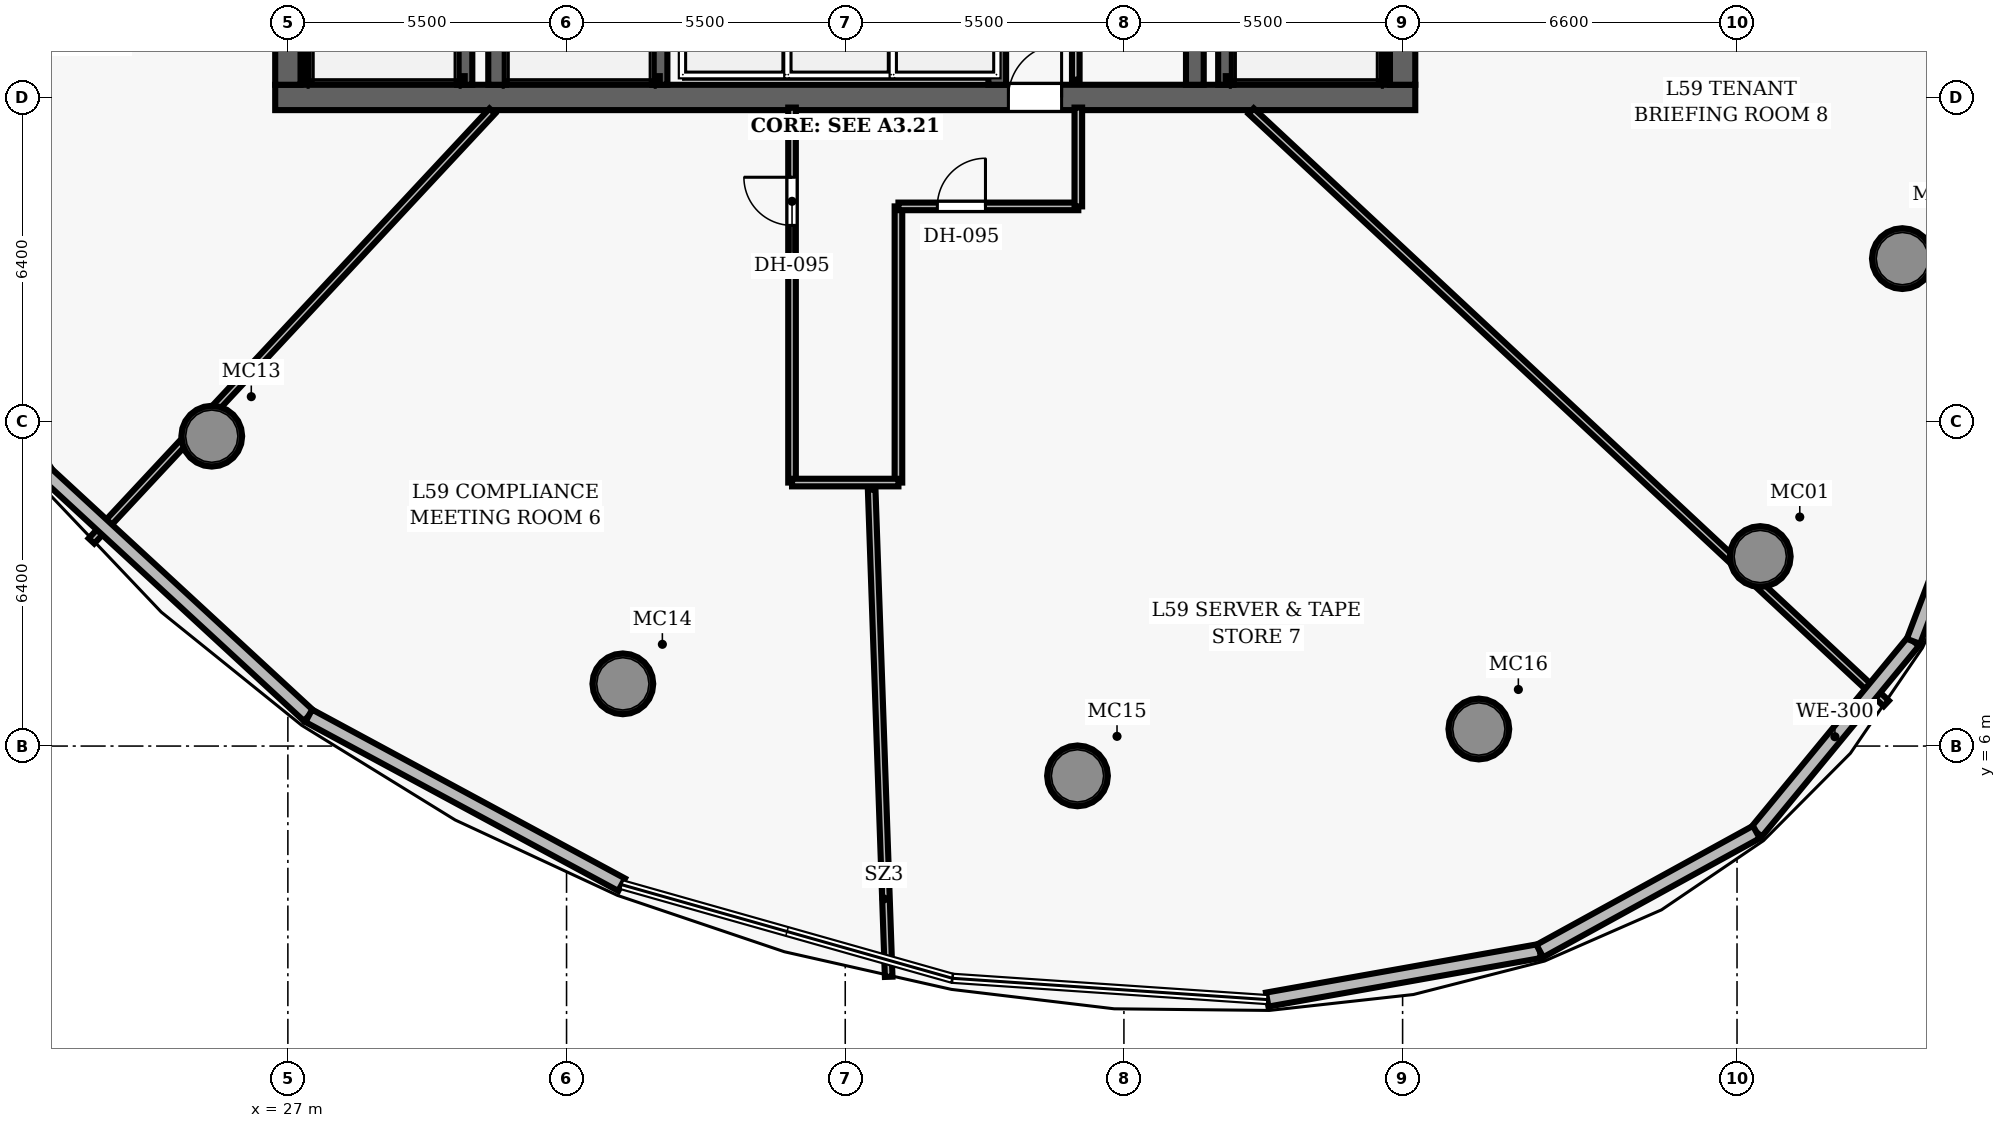
"""IFC4 building model, lengths in metres.
Left out: names, types, materials, properties, quantities, classifications, styles, units other than length and angle.
Written with IfcOpenShell. Run it as: python <this file> out.ifc"""

import sys

from ifc_helpers import new_model, si_unit, direction, frame, frame_2d, origin, origin_2d, place, context, subcontext, project, spatial, rectangle, hollow_circle, extrude, element, fill, save


model = new_model("IFC4")
c1 = context("Model", 3, precision=1e-05, world=origin(), true_north=direction((0.0, 1.0)))
c2 = subcontext(c1, "Body", "Model", "MODEL_VIEW")
j1 = project(units=[si_unit("LENGTHUNIT", "METRE"), si_unit("PLANEANGLEUNIT", "RADIAN")], contexts=[c1])
p1 = place(None, origin())
s1 = spatial("IfcSite", under=j1, at=p1, CompositionType="ELEMENT")
p2 = place(p1, origin())
s2 = spatial("IfcBuilding", under=s1, at=p2, CompositionType="ELEMENT")
p3 = place(p2, frame((0.0, 0.0, 232.8)))
s3 = spatial("IfcBuildingStorey", under=s2, at=p3, CompositionType="ELEMENT", Elevation=232.8)
p4 = place(p3, frame((26.75, 18.8, 0.0), z_axis=(0.0, 0.0, 1.0), x_axis=(1.0, 0.0, 0.0)))
e1 = element("IfcWall", 1, at=p4, inside=s3, PredefinedType="SHEAR", context=c2, shape_type="SweptSolid", body=[
    extrude(rectangle(XDim=22.5, YDim=0.5, at=frame_2d((11.25, 0.0))), origin(), (0.0, 0.0, 1.0), 3.85),
])
p5 = place(p4, frame((14.47, 0.0, 0.0)))
e2 = element("IfcOpeningElement", 2, at=p5, cuts=e1, PredefinedType="OPENING", context=c2, shape_type="SweptSolid", body=[
    extrude(rectangle(XDim=1.05, YDim=2.15, at=frame_2d((0.525, 1.075))), frame((0.0, 0.26, 0.0), z_axis=(0.0, -1.0, 0.0), x_axis=(1.0, 0.0, 0.0)), (0.0, 0.0, 1.0), 0.52),
])
p6 = place(p3, frame((27.0, 19.05, 0.0), z_axis=(0.0, 0.0, 1.0), x_axis=(0.0, 1.0, 0.0)))
e3 = element("IfcWall", 3, at=p6, inside=s3, PredefinedType="SHEAR", context=c2, shape_type="SweptSolid", body=[
    extrude(rectangle(XDim=13.9, YDim=0.5, at=frame_2d((6.95, 0.0))), origin(), (0.0, 0.0, 1.0), 3.85),
])
p7 = place(p6, frame((8.2, 0.0, 0.0)))
e4 = element("IfcOpeningElement", 4, at=p7, cuts=e3, PredefinedType="OPENING", context=c2, shape_type="SweptSolid", body=[
    extrude(rectangle(XDim=1.05, YDim=2.15, at=frame_2d((0.525, 1.075))), frame((0.0, 0.26, 0.0), z_axis=(0.0, -1.0, 0.0), x_axis=(1.0, 0.0, 0.0)), (0.0, 0.0, 1.0), 0.52),
])
p8 = place(p3, frame((49.0, 19.05, 0.0), z_axis=(0.0, 0.0, 1.0), x_axis=(0.0, 1.0, 0.0)))
e5 = element("IfcWall", 5, at=p8, inside=s3, PredefinedType="SHEAR", context=c2, shape_type="SweptSolid", body=[
    extrude(rectangle(XDim=13.9, YDim=0.5, at=frame_2d((6.95, 0.0))), origin(), (0.0, 0.0, 1.0), 3.85),
])
p9 = place(p8, frame((8.2, 0.0, 0.0)))
e6 = element("IfcOpeningElement", 6, at=p9, cuts=e5, PredefinedType="OPENING", context=c2, shape_type="SweptSolid", body=[
    extrude(rectangle(XDim=1.05, YDim=2.15, at=frame_2d((0.525, 1.075))), frame((0.0, 0.26, 0.0), z_axis=(0.0, -1.0, 0.0), x_axis=(1.0, 0.0, 0.0)), (0.0, 0.0, 1.0), 0.52),
])
for number, where, z_axis, x_axis in (
    (7, (31.13, 19.05, 0.0), (0.0, 0.0, 1.0), (0.0, 1.0, 0.0)),
    (8, (44.9, 19.05, 0.0), (0.0, 0.0, 1.0), (0.0, 1.0, 0.0)),
):
    element("IfcWall", number, at=place(p3, frame(where, z_axis=z_axis, x_axis=x_axis)), inside=s3, PredefinedType="SHEAR", context=c2, shape_type="SweptSolid", body=[
        extrude(rectangle(XDim=13.9, YDim=0.35, at=frame_2d((6.95, 0.0))), origin(), (0.0, 0.0, 1.0), 3.85),
    ])
for number, where, z_axis, x_axis in (
    (9, (56.058, 9.74, 0.0), (0.0, 0.0, 1.0), (1.0, 0.0, 0.0)),
    (10, (58.863, 15.619, 0.0), (0.0, 0.0, 1.0), (1.0, 0.0, 0.0)),
    (11, (25.498, 12.115, 0.0), (0.0, 0.0, 1.0), (1.0, 0.0, 0.0)),
    (12, (33.611, 7.228, 0.0), (0.0, 0.0, 1.0), (1.0, 0.0, 0.0)),
    (13, (42.584, 5.412, 0.0), (0.0, 0.0, 1.0), (1.0, 0.0, 0.0)),
    (14, (50.504, 6.336, 0.0), (0.0, 0.0, 1.0), (1.0, 0.0, 0.0)),
):
    element("IfcColumn", number, at=place(p3, frame(where, z_axis=z_axis, x_axis=x_axis)), inside=s3, PredefinedType="COLUMN", context=c2, shape_type="SweptSolid", body=[
        extrude(hollow_circle(Radius=0.6, WallThickness=0.05, at=origin_2d()), origin(), (0.0, 0.0, 1.0), 3.85),
    ])
p10 = place(p3, frame((30.49, 19.05, 0.0), z_axis=(0.0, 0.0, 1.0), x_axis=(0.0, 1.0, 0.0)))
e15 = element("IfcWall", 15, at=p10, inside=s3, PredefinedType="SHEAR", context=c2, shape_type="SweptSolid", body=[
    extrude(rectangle(XDim=7.5, YDim=0.3, at=frame_2d((3.75, 0.0))), origin(), (0.0, 0.0, 1.0), 3.85),
])
p11 = place(p3, frame((27.395, 19.1, 0.0), z_axis=(0.0, 0.0, 1.0), x_axis=(0.0, 1.0, 0.0)))
e16 = element("IfcWall", 16, at=p11, inside=s3, PredefinedType="SHEAR", context=c2, shape_type="SweptSolid", body=[
    extrude(rectangle(XDim=7.45, YDim=0.12, at=frame_2d((3.725, 0.0))), origin(), (0.0, 0.0, 1.0), 3.85),
])
p12 = place(p3, frame((27.395, 19.16, 0.0), z_axis=(0.0, 0.0, 1.0), x_axis=(1.0, 0.0, 0.0)))
e17 = element("IfcWall", 17, at=p12, inside=s3, PredefinedType="SHEAR", context=c2, shape_type="SweptSolid", body=[
    extrude(rectangle(XDim=3.095, YDim=0.12, at=frame_2d((1.547, 0.0))), origin(), (0.0, 0.0, 1.0), 3.85),
])
p13 = place(p3, frame((45.51, 19.05, 0.0), z_axis=(0.0, 0.0, 1.0), x_axis=(0.0, 1.0, 0.0)))
e18 = element("IfcWall", 18, at=p13, inside=s3, PredefinedType="SHEAR", context=c2, shape_type="SweptSolid", body=[
    extrude(rectangle(XDim=7.5, YDim=0.3, at=frame_2d((3.75, 0.0))), origin(), (0.0, 0.0, 1.0), 3.85),
])
p14 = place(p3, frame((48.605, 19.1, 0.0), z_axis=(0.0, 0.0, 1.0), x_axis=(0.0, 1.0, 0.0)))
e19 = element("IfcWall", 19, at=p14, inside=s3, PredefinedType="SHEAR", context=c2, shape_type="SweptSolid", body=[
    extrude(rectangle(XDim=7.45, YDim=0.12, at=frame_2d((3.725, 0.0))), origin(), (0.0, 0.0, 1.0), 3.85),
])
p15 = place(p3, frame((45.51, 19.16, 0.0), z_axis=(0.0, 0.0, 1.0), x_axis=(1.0, 0.0, 0.0)))
e20 = element("IfcWall", 20, at=p15, inside=s3, PredefinedType="SHEAR", context=c2, shape_type="SweptSolid", body=[
    extrude(rectangle(XDim=3.095, YDim=0.12, at=frame_2d((1.547, 0.0))), origin(), (0.0, 0.0, 1.0), 3.85),
])
p16 = place(p3, frame((34.34, 19.05, 0.0), z_axis=(0.0, 0.0, 1.0), x_axis=(0.0, 1.0, 0.0)))
e21 = element("IfcWall", 21, at=p16, inside=s3, PredefinedType="SHEAR", context=c2, shape_type="SweptSolid", body=[
    extrude(rectangle(XDim=7.5, YDim=0.3, at=frame_2d((3.75, 0.0))), origin(), (0.0, 0.0, 1.0), 3.85),
])
p17 = place(p3, frame((31.3, 19.16, 0.0), z_axis=(0.0, 0.0, 1.0), x_axis=(1.0, 0.0, 0.0)))
e22 = element("IfcWall", 22, at=p17, inside=s3, PredefinedType="SHEAR", context=c2, shape_type="SweptSolid", body=[
    extrude(rectangle(XDim=3.04, YDim=0.12, at=frame_2d((1.52, 0.0))), origin(), (0.0, 0.0, 1.0), 3.85),
])
p18 = place(p3, frame((41.0, 19.05, 0.0), z_axis=(0.0, 0.0, 1.0), x_axis=(0.0, 1.0, 0.0)))
e23 = element("IfcWall", 23, at=p18, inside=s3, PredefinedType="SHEAR", context=c2, shape_type="SweptSolid", body=[
    extrude(rectangle(XDim=2.08, YDim=0.35, at=frame_2d((1.04, 0.0))), origin(), (0.0, 0.0, 1.0), 2.915),
])
p19 = place(p3, frame((42.55, 19.15, 0.0), z_axis=(0.0, 0.0, 1.0), x_axis=(0.0, 1.0, 0.0)))
e24 = element("IfcWall", 24, at=p19, inside=s3, PredefinedType="PARTITIONING", context=c2, shape_type="SweptSolid", body=[
    extrude(rectangle(XDim=2.75, YDim=0.15, at=frame_2d((1.375, 0.0))), origin(), (0.0, 0.0, 1.0), 2.915),
])
p20 = place(p19, frame((0.7, 0.0, 0.0)))
e25 = element("IfcOpeningElement", 25, at=p20, cuts=e24, PredefinedType="OPENING", context=c2, shape_type="SweptSolid", body=[
    extrude(rectangle(XDim=0.85, YDim=2.1, at=frame_2d((0.425, 1.05))), frame((0.0, 0.085, 0.0), z_axis=(0.0, -1.0, 0.0), x_axis=(1.0, 0.0, 0.0)), (0.0, 0.0, 1.0), 0.17),
])
p21 = place(p3, frame((36.95, 11.2, 0.0), z_axis=(0.0, 0.0, 1.0), x_axis=(0.0, 1.0, 0.0)))
e26 = element("IfcWall", 26, at=p21, inside=s3, PredefinedType="PARTITIONING", context=c2, shape_type="SweptSolid", body=[
    extrude(rectangle(XDim=7.4, YDim=0.15, at=frame_2d((3.7, 0.0))), origin(), (0.0, 0.0, 1.0), 2.915),
])
p22 = place(p21, frame((5.075, 0.0, 0.0)))
e27 = element("IfcOpeningElement", 27, at=p22, cuts=e26, PredefinedType="OPENING", context=c2, shape_type="SweptSolid", body=[
    extrude(rectangle(XDim=0.95, YDim=2.15, at=frame_2d((0.475, 1.075))), frame((0.0, 0.085, 0.0), z_axis=(0.0, -1.0, 0.0), x_axis=(1.0, 0.0, 0.0)), (0.0, 0.0, 1.0), 0.17),
])
p23 = place(p3, frame((39.05, 11.2, 0.0), z_axis=(0.0, 0.0, 1.0), x_axis=(0.0, 1.0, 0.0)))
e28 = element("IfcWall", 28, at=p23, inside=s3, PredefinedType="PARTITIONING", context=c2, shape_type="SweptSolid", body=[
    extrude(rectangle(XDim=5.45, YDim=0.15, at=frame_2d((2.725, 0.0))), origin(), (0.0, 0.0, 1.0), 2.915),
])
p24 = place(p3, frame((39.05, 16.65, 0.0), z_axis=(0.0, 0.0, 1.0), x_axis=(1.0, 0.0, 0.0)))
e29 = element("IfcWall", 29, at=p24, inside=s3, PredefinedType="PARTITIONING", context=c2, shape_type="SweptSolid", body=[
    extrude(rectangle(XDim=3.55, YDim=0.15, at=frame_2d((1.775, 0.0))), origin(), (0.0, 0.0, 1.0), 2.915),
])
p25 = place(p24, frame((0.768, 0.0, 0.0)))
e30 = element("IfcOpeningElement", 30, at=p25, cuts=e29, PredefinedType="OPENING", context=c2, shape_type="SweptSolid", body=[
    extrude(rectangle(XDim=0.95, YDim=2.15, at=frame_2d((0.475, 1.075))), frame((0.0, 0.085, 0.0), z_axis=(0.0, -1.0, 0.0), x_axis=(1.0, 0.0, 0.0)), (0.0, 0.0, 1.0), 0.17),
])
p26 = place(p3, frame((42.6, 16.65, 0.0), z_axis=(0.0, 0.0, 1.0), x_axis=(0.0, 1.0, 0.0)))
e31 = element("IfcWall", 31, at=p26, inside=s3, PredefinedType="PARTITIONING", context=c2, shape_type="SweptSolid", body=[
    extrude(rectangle(XDim=1.95, YDim=0.15, at=frame_2d((0.975, 0.0))), origin(), (0.0, 0.0, 1.0), 2.915),
])
p27 = place(p3, frame((36.95, 11.2, 0.0), z_axis=(0.0, 0.0, 1.0), x_axis=(1.0, 0.0, 0.0)))
e32 = element("IfcWall", 32, at=p27, inside=s3, PredefinedType="PARTITIONING", context=c2, shape_type="SweptSolid", body=[
    extrude(rectangle(XDim=2.1, YDim=0.15, at=frame_2d((1.05, 0.0))), origin(), (0.0, 0.0, 1.0), 2.915),
])
p28 = place(p3, frame((31.034, 18.53, 0.0), z_axis=(0.0, 0.0, 1.0), x_axis=(-0.681994935562, -0.731356895002, 0.0)))
e33 = element("IfcWall", 33, at=p28, inside=s3, PredefinedType="PARTITIONING", context=c2, shape_type="SweptSolid", body=[
    extrude(rectangle(XDim=11.598, YDim=0.15, at=frame_2d((5.799, 0.0))), origin(), (0.0, 0.0, 1.0), 2.915),
])
p29 = place(p3, frame((38.522, 11.06, 0.0), z_axis=(0.0, 0.0, 1.0), x_axis=(0.034896706819, -0.99939092444, 0.0)))
e34 = element("IfcWall", 34, at=p29, inside=s3, PredefinedType="PARTITIONING", context=c2, shape_type="SweptSolid", body=[
    extrude(rectangle(XDim=9.62, YDim=0.15, at=frame_2d((4.81, 0.0))), origin(), (0.0, 0.0, 1.0), 2.915),
])
p30 = place(p3, frame((46.01, 18.53, 0.0), z_axis=(0.0, 0.0, 1.0), x_axis=(0.731354089415, -0.681997944202, 0.0)))
e35 = element("IfcWall", 35, at=p30, inside=s3, PredefinedType="PARTITIONING", context=c2, shape_type="SweptSolid", body=[
    extrude(rectangle(XDim=17.14, YDim=0.15, at=frame_2d((8.57, 0.0))), origin(), (0.0, 0.0, 1.0), 2.915),
])
p31 = place(p3, frame((59.082, 8.066, 0.0), z_axis=(0.0, 0.0, 1.0), x_axis=(-0.635840615574, -0.771820388165, 0.0)))
e36 = element("IfcWall", 36, at=p31, inside=s3, PredefinedType="SOLIDWALL", context=c2, shape_type="SweptSolid", body=[
    extrude(rectangle(XDim=4.876, YDim=0.28, at=frame_2d((2.438, 0.0))), origin(), (0.0, 0.0, 1.0), 3.5),
])
p32 = place(p3, frame((61.022, 13.175, 0.0), z_axis=(0.0, 0.0, 1.0), x_axis=(-0.355042078818, -0.934850320783, 0.0)))
e37 = element("IfcWall", 37, at=p32, inside=s3, PredefinedType="SOLIDWALL", context=c2, shape_type="SweptSolid", body=[
    extrude(rectangle(XDim=5.465, YDim=0.28, at=frame_2d((2.732, 0.0))), origin(), (0.0, 0.0, 1.0), 3.5),
])
p33 = place(p3, frame((22.234, 11.376, 0.0), z_axis=(0.0, 0.0, 1.0), x_axis=(-0.529974021184, 0.848013877758, 0.0)))
e38 = element("IfcWall", 38, at=p33, inside=s3, PredefinedType="SOLIDWALL", context=c2, shape_type="SweptSolid", body=[
    extrude(rectangle(XDim=7.045, YDim=0.28, at=frame_2d((3.523, 0.0))), origin(), (0.0, 0.0, 1.0), 3.5),
])
p34 = place(p3, frame((27.412, 6.597, 0.0), z_axis=(0.0, 0.0, 1.0), x_axis=(-0.734865878673, 0.678212459604, 0.0)))
e39 = element("IfcWall", 39, at=p34, inside=s3, PredefinedType="SOLIDWALL", context=c2, shape_type="SweptSolid", body=[
    extrude(rectangle(XDim=7.046, YDim=0.28, at=frame_2d((3.523, 0.0))), origin(), (0.0, 0.0, 1.0), 3.5),
])
p35 = place(p3, frame((33.587, 3.264, 0.0), z_axis=(0.0, 0.0, 1.0), x_axis=(-0.879989165457, 0.474993756463, 0.0)))
e40 = element("IfcWall", 40, at=p35, inside=s3, PredefinedType="SOLIDWALL", context=c2, shape_type="SweptSolid", body=[
    extrude(rectangle(XDim=7.018, YDim=0.28, at=frame_2d((3.509, 0.0))), origin(), (0.0, 0.0, 1.0), 3.5),
])
p36 = place(p3, frame((51.708, 1.955, 0.0), z_axis=(0.0, 0.0, 1.0), x_axis=(-0.984520218029, -0.175271048073, 0.0)))
e41 = element("IfcWall", 41, at=p36, inside=s3, PredefinedType="SOLIDWALL", context=c2, shape_type="SweptSolid", body=[
    extrude(rectangle(XDim=5.464, YDim=0.28, at=frame_2d((2.732, 0.0))), origin(), (0.0, 0.0, 1.0), 3.5),
])
p37 = place(p3, frame((55.981, 4.302, 0.0), z_axis=(0.0, 0.0, 1.0), x_axis=(-0.876443087994, -0.481505465709, 0.0)))
e42 = element("IfcWall", 42, at=p37, inside=s3, PredefinedType="SOLIDWALL", context=c2, shape_type="SweptSolid", body=[
    extrude(rectangle(XDim=4.876, YDim=0.28, at=frame_2d((2.438, 0.0))), origin(), (0.0, 0.0, 1.0), 3.5),
])
p38 = place(p5, origin())
e43 = element("IfcDoor", 43, at=p38, inside=s3, OperationType="SINGLE_SWING_RIGHT", PredefinedType="DOOR", context=c2, shape_type="SweptSolid", body=[
    extrude(rectangle(XDim=1.05, YDim=2.15, at=frame_2d((0.525, 1.075))), frame((0.0, 0.025, 0.0), z_axis=(0.0, -1.0, 0.0), x_axis=(1.0, 0.0, 0.0)), (0.0, 0.0, 1.0), 0.05),
])
fill(e2, e43)
p39 = place(p22, origin())
e44 = element("IfcDoor", 44, at=p39, inside=s3, OperationType="SINGLE_SWING_RIGHT", PredefinedType="DOOR", context=c2, shape_type="SweptSolid", body=[
    extrude(rectangle(XDim=0.95, YDim=2.15, at=frame_2d((0.475, 1.075))), frame((0.0, 0.025, 0.0), z_axis=(0.0, -1.0, 0.0), x_axis=(1.0, 0.0, 0.0)), (0.0, 0.0, 1.0), 0.05),
])
fill(e27, e44)
p40 = place(p25, origin())
e45 = element("IfcDoor", 45, at=p40, inside=s3, OperationType="SINGLE_SWING_RIGHT", PredefinedType="DOOR", context=c2, shape_type="SweptSolid", body=[
    extrude(rectangle(XDim=0.95, YDim=2.15, at=frame_2d((0.475, 1.075))), frame((0.0, 0.025, 0.0), z_axis=(0.0, -1.0, 0.0), x_axis=(1.0, 0.0, 0.0)), (0.0, 0.0, 1.0), 0.05),
])
fill(e30, e45)
save(model, sys.argv[1])
